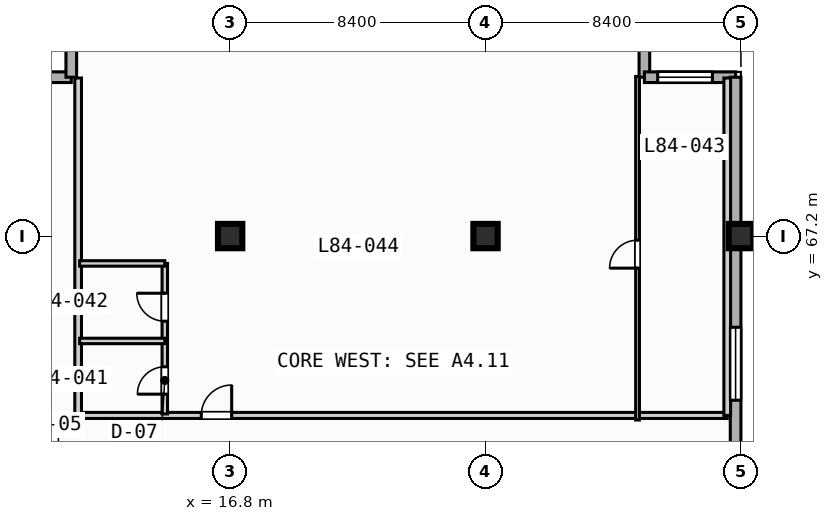
"""IFC4 building model, lengths in metres.
Left out: names, types, materials, properties, quantities, classifications, styles, units other than length and angle.
Written with IfcOpenShell. Run it as: python <this file> out.ifc"""

import sys

from ifc_helpers import new_model, si_unit, direction, frame, frame_2d, origin, origin_2d, place, context, subcontext, project, spatial, rectangle, extrude, element, fill, save


model = new_model("IFC4")
c1 = context("Model", 3, precision=1e-05, world=origin(), true_north=direction((0.0, 1.0)))
c2 = subcontext(c1, "Body", "Model", "MODEL_VIEW")
j1 = project(units=[si_unit("LENGTHUNIT", "METRE"), si_unit("PLANEANGLEUNIT", "RADIAN")], contexts=[c1])
p1 = place(None, origin())
s1 = spatial("IfcSite", under=j1, at=p1, CompositionType="ELEMENT")
p2 = place(p1, origin())
s2 = spatial("IfcBuilding", under=s1, at=p2, CompositionType="ELEMENT")
p3 = place(p2, frame((0.0, 0.0, 339.8)))
s3 = spatial("IfcBuildingStorey", under=s2, at=p3, CompositionType="ELEMENT", Elevation=339.8)
for number, where, z_axis, x_axis in (
    (1, (16.8, 67.2, 0.0), (0.0, 0.0, 1.0), (1.0, 0.0, 0.0)),
    (2, (25.2, 67.2, 0.0), (0.0, 0.0, 1.0), (1.0, 0.0, 0.0)),
    (3, (33.6, 67.2, 0.0), (0.0, 0.0, 1.0), (1.0, 0.0, 0.0)),
):
    element("IfcColumn", number, at=place(p3, frame(where, z_axis=z_axis, x_axis=x_axis)), inside=s3, PredefinedType="COLUMN", context=c2, shape_type="SweptSolid", body=[
        extrude(rectangle(XDim=0.8, YDim=0.8, at=origin_2d()), origin(), (0.0, 0.0, 1.0), 3.9),
    ])
for number, where, z_axis, x_axis in (
    (4, (8.575, 72.425, 0.0), (0.0, 0.0, 1.0), (1.0, 0.0, 0.0)),
    (5, (11.575, 72.425, 0.0), (0.0, 0.0, 1.0), (0.0, 1.0, 0.0)),
    (6, (30.425, 75.425, 0.0), (0.0, 0.0, 1.0), (0.0, -1.0, 0.0)),
):
    element("IfcWall", number, at=place(p3, frame(where, z_axis=z_axis, x_axis=x_axis)), inside=s3, PredefinedType="STANDARD", context=c2, shape_type="SweptSolid", body=[
        extrude(rectangle(XDim=3.0, YDim=0.35, at=frame_2d((1.5, 0.0))), origin(), (0.0, 0.0, 1.0), 3.67),
    ])
p4 = place(p3, frame((30.425, 72.425, 0.0), z_axis=(0.0, 0.0, 1.0), x_axis=(1.0, 0.0, 0.0)))
e7 = element("IfcWall", 7, at=p4, inside=s3, PredefinedType="STANDARD", context=c2, shape_type="SweptSolid", body=[
    extrude(rectangle(XDim=3.0, YDim=0.35, at=frame_2d((1.5, 0.0))), origin(), (0.0, 0.0, 1.0), 3.67),
])
p5 = place(p4, frame((0.438, 0.0, 0.85)))
e8 = element("IfcOpeningElement", 8, at=p5, cuts=e7, PredefinedType="OPENING", context=c2, shape_type="SweptSolid", body=[
    extrude(rectangle(XDim=1.8, YDim=1.8, at=frame_2d((0.9, 0.9))), frame((0.0, 0.185, 0.0), z_axis=(0.0, -1.0, 0.0), x_axis=(1.0, 0.0, 0.0)), (0.0, 0.0, 1.0), 0.37),
])
p6 = place(p3, frame((33.425, 72.425, 0.0), z_axis=(0.0, 0.0, 1.0), x_axis=(0.0, -1.0, 0.0)))
e9 = element("IfcWall", 9, at=p6, inside=s3, PredefinedType="STANDARD", context=c2, shape_type="SweptSolid", body=[
    extrude(rectangle(XDim=39.0, YDim=0.35, at=frame_2d((19.5, 0.0))), origin(), (0.0, 0.0, 1.0), 3.67),
])
p7 = place(p6, frame((33.725, 0.0, 0.85)))
e10 = element("IfcOpeningElement", 10, at=p7, cuts=e9, PredefinedType="OPENING", context=c2, shape_type="SweptSolid", body=[
    extrude(rectangle(XDim=1.8, YDim=1.8, at=frame_2d((0.9, 0.9))), frame((0.0, 0.185, 0.0), z_axis=(0.0, -1.0, 0.0), x_axis=(1.0, 0.0, 0.0)), (0.0, 0.0, 1.0), 0.37),
])
p8 = place(p6, frame((8.225, 0.0, 0.85)))
e11 = element("IfcOpeningElement", 11, at=p8, cuts=e9, PredefinedType="OPENING", context=c2, shape_type="SweptSolid", body=[
    extrude(rectangle(XDim=2.4, YDim=1.95, at=frame_2d((1.2, 0.975))), frame((0.0, 0.185, 0.0), z_axis=(0.0, -1.0, 0.0), x_axis=(1.0, 0.0, 0.0)), (0.0, 0.0, 1.0), 0.37),
])
p9 = place(p3, frame((11.8, 61.3, 0.0), z_axis=(0.0, 0.0, 1.0), x_axis=(1.0, 0.0, 0.0)))
e12 = element("IfcWall", 12, at=p9, inside=s3, PredefinedType="PARTITIONING", context=c2, shape_type="SweptSolid", body=[
    extrude(rectangle(XDim=21.35, YDim=0.2, at=frame_2d((10.675, 0.0))), origin(), (0.0, 0.0, 1.0), 3.67),
])
p10 = place(p9, frame((4.05, 0.0, 0.0)))
e13 = element("IfcOpeningElement", 13, at=p10, cuts=e12, PredefinedType="OPENING", context=c2, shape_type="SweptSolid", body=[
    extrude(rectangle(XDim=1.0, YDim=2.15, at=frame_2d((0.5, 1.075))), frame((0.0, 0.11, 0.0), z_axis=(0.0, -1.0, 0.0), x_axis=(1.0, 0.0, 0.0)), (0.0, 0.0, 1.0), 0.22),
])
for number, where, z_axis, x_axis in (
    (14, (33.15, 61.3, 0.0), (0.0, 0.0, 1.0), (0.0, 1.0, 0.0)),
    (15, (11.8, 61.3, 0.0), (0.0, 0.0, 1.0), (0.0, 1.0, 0.0)),
):
    element("IfcWall", number, at=place(p3, frame(where, z_axis=z_axis, x_axis=x_axis)), inside=s3, PredefinedType="PARTITIONING", context=c2, shape_type="SweptSolid", body=[
        extrude(rectangle(XDim=11.1, YDim=0.22, at=frame_2d((5.55, 0.0))), origin(), (0.0, 0.0, 1.0), 3.67),
    ])
p11 = place(p3, frame((14.65, 61.35, 0.0), z_axis=(0.0, 0.0, 1.0), x_axis=(0.0, 1.0, 0.0)))
e16 = element("IfcWall", 16, at=p11, inside=s3, PredefinedType="PLUMBINGWALL", context=c2, shape_type="SweptSolid", body=[
    extrude(rectangle(XDim=4.95, YDim=0.18, at=frame_2d((2.475, 0.0))), origin(), (0.0, 0.0, 1.0), 3.67),
])
p12 = place(p11, frame((0.65, 0.0, 0.0)))
e17 = element("IfcOpeningElement", 17, at=p12, cuts=e16, PredefinedType="OPENING", context=c2, shape_type="SweptSolid", body=[
    extrude(rectangle(XDim=0.9, YDim=2.1, at=frame_2d((0.45, 1.05))), frame((0.0, 0.1, 0.0), z_axis=(0.0, -1.0, 0.0), x_axis=(1.0, 0.0, 0.0)), (0.0, 0.0, 1.0), 0.2),
])
p13 = place(p11, frame((3.05, 0.0, 0.0)))
e18 = element("IfcOpeningElement", 18, at=p13, cuts=e16, PredefinedType="OPENING", context=c2, shape_type="SweptSolid", body=[
    extrude(rectangle(XDim=0.92, YDim=2.1, at=frame_2d((0.46, 1.05))), frame((0.0, 0.1, 0.0), z_axis=(0.0, -1.0, 0.0), x_axis=(1.0, 0.0, 0.0)), (0.0, 0.0, 1.0), 0.2),
])
for number, where, z_axis, x_axis in (
    (19, (11.85, 63.75, 0.0), (0.0, 0.0, 1.0), (1.0, 0.0, 0.0)),
    (20, (11.85, 66.3, 0.0), (0.0, 0.0, 1.0), (1.0, 0.0, 0.0)),
):
    element("IfcWall", number, at=place(p3, frame(where, z_axis=z_axis, x_axis=x_axis)), inside=s3, PredefinedType="PLUMBINGWALL", context=c2, shape_type="SweptSolid", body=[
        extrude(rectangle(XDim=2.8, YDim=0.18, at=frame_2d((1.4, 0.0))), origin(), (0.0, 0.0, 1.0), 3.67),
    ])
p14 = place(p3, frame((30.2, 61.15, 0.0), z_axis=(0.0, 0.0, 1.0), x_axis=(0.0, 1.0, 0.0)))
e21 = element("IfcWall", 21, at=p14, inside=s3, PredefinedType="PARTITIONING", context=c2, shape_type="SweptSolid", body=[
    extrude(rectangle(XDim=11.3, YDim=0.125, at=frame_2d((5.65, 0.0))), origin(), (0.0, 0.0, 1.0), 3.67),
])
p15 = place(p14, frame((4.995, 0.0, 0.0)))
e22 = element("IfcOpeningElement", 22, at=p15, cuts=e21, PredefinedType="OPENING", context=c2, shape_type="SweptSolid", body=[
    extrude(rectangle(XDim=0.92, YDim=2.1, at=frame_2d((0.46, 1.05))), frame((0.0, 0.073, 0.0), z_axis=(0.0, -1.0, 0.0), x_axis=(1.0, 0.0, 0.0)), (0.0, 0.0, 1.0), 0.145),
])
p16 = place(p5, origin())
e23 = element("IfcWindow", 23, at=p16, inside=s3, PartitioningType="SINGLE_PANEL", PredefinedType="WINDOW", context=c2, shape_type="SweptSolid", body=[
    extrude(rectangle(XDim=1.8, YDim=1.8, at=frame_2d((0.9, 0.9))), frame((0.0, 0.03, 0.0), z_axis=(0.0, -1.0, 0.0), x_axis=(1.0, 0.0, 0.0)), (0.0, 0.0, 1.0), 0.06),
])
fill(e8, e23)
p17 = place(p8, origin())
e24 = element("IfcWindow", 24, at=p17, inside=s3, PartitioningType="SINGLE_PANEL", PredefinedType="WINDOW", context=c2, shape_type="SweptSolid", body=[
    extrude(rectangle(XDim=2.4, YDim=1.95, at=frame_2d((1.2, 0.975))), frame((0.0, 0.03, 0.0), z_axis=(0.0, -1.0, 0.0), x_axis=(1.0, 0.0, 0.0)), (0.0, 0.0, 1.0), 0.06),
])
fill(e11, e24)
p18 = place(p10, origin())
e25 = element("IfcDoor", 25, at=p18, inside=s3, OperationType="SINGLE_SWING_RIGHT", PredefinedType="DOOR", context=c2, shape_type="SweptSolid", body=[
    extrude(rectangle(XDim=1.0, YDim=2.15, at=frame_2d((0.5, 1.075))), frame((0.0, 0.025, 0.0), z_axis=(0.0, -1.0, 0.0), x_axis=(1.0, 0.0, 0.0)), (0.0, 0.0, 1.0), 0.05),
])
fill(e13, e25)
p19 = place(p12, origin())
e26 = element("IfcDoor", 26, at=p19, inside=s3, OperationType="SINGLE_SWING_LEFT", PredefinedType="DOOR", context=c2, shape_type="SweptSolid", body=[
    extrude(rectangle(XDim=0.9, YDim=2.1, at=frame_2d((0.45, 1.05))), frame((0.0, 0.025, 0.0), z_axis=(0.0, -1.0, 0.0), x_axis=(1.0, 0.0, 0.0)), (0.0, 0.0, 1.0), 0.05),
])
fill(e17, e26)
p20 = place(p13, origin())
e27 = element("IfcDoor", 27, at=p20, inside=s3, OperationType="SINGLE_SWING_RIGHT", PredefinedType="DOOR", context=c2, shape_type="SweptSolid", body=[
    extrude(rectangle(XDim=0.92, YDim=2.1, at=frame_2d((0.46, 1.05))), frame((0.0, 0.025, 0.0), z_axis=(0.0, -1.0, 0.0), x_axis=(1.0, 0.0, 0.0)), (0.0, 0.0, 1.0), 0.05),
])
fill(e18, e27)
p21 = place(p15, origin())
e28 = element("IfcDoor", 28, at=p21, inside=s3, OperationType="SINGLE_SWING_LEFT", PredefinedType="DOOR", context=c2, shape_type="SweptSolid", body=[
    extrude(rectangle(XDim=0.92, YDim=2.1, at=frame_2d((0.46, 1.05))), frame((0.0, 0.025, 0.0), z_axis=(0.0, -1.0, 0.0), x_axis=(1.0, 0.0, 0.0)), (0.0, 0.0, 1.0), 0.05),
])
fill(e22, e28)
save(model, sys.argv[1])
